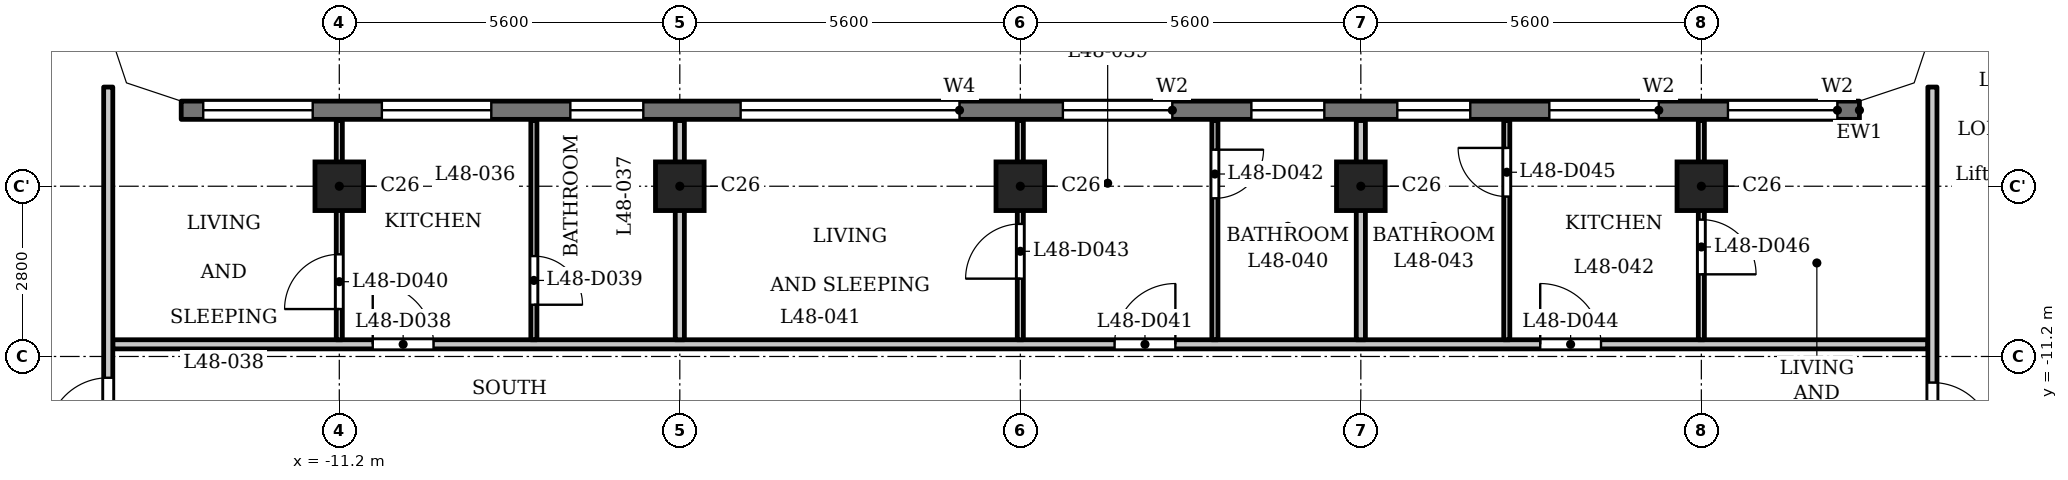
"""IFC4 building model, lengths in metres.
Left out: names, types, materials, properties, quantities, classifications, styles, units other than length and angle.
Written with IfcOpenShell. Run it as: python <this file> out.ifc"""

import sys

from ifc_helpers import new_model, si_unit, direction, frame, frame_2d, origin, origin_2d, place, context, subcontext, project, spatial, polyline, rectangle, outline, extrude, element, fill, save


model = new_model("IFC4")
c1 = context("Model", 3, precision=1e-05, world=origin(), true_north=direction((0.0, 1.0)))
c2 = subcontext(c1, "Body", "Model", "MODEL_VIEW")
j1 = project(units=[si_unit("LENGTHUNIT", "METRE"), si_unit("PLANEANGLEUNIT", "RADIAN")], contexts=[c1])
p1 = place(None, origin())
s1 = spatial("IfcSite", under=j1, at=p1, CompositionType="ELEMENT")
p2 = place(p1, origin())
s2 = spatial("IfcBuilding", under=s1, at=p2, CompositionType="ELEMENT")
p3 = place(p2, frame((0.0, 0.0, 188.9)))
s3 = spatial("IfcBuildingStorey", under=s2, at=p3, CompositionType="ELEMENT", Elevation=188.9)
for number, where, z_axis, x_axis in (
    (1, (-11.2, -8.4, 0.0), (0.0, 0.0, 1.0), (1.0, 0.0, 0.0)),
    (2, (-5.6, -8.4, 0.0), (0.0, 0.0, 1.0), (1.0, 0.0, 0.0)),
    (3, (0.0, -8.4, 0.0), (0.0, 0.0, 1.0), (1.0, 0.0, 0.0)),
    (4, (5.6, -8.4, 0.0), (0.0, 0.0, 1.0), (1.0, 0.0, 0.0)),
    (5, (11.2, -8.4, 0.0), (0.0, 0.0, 1.0), (1.0, 0.0, 0.0)),
):
    element("IfcColumn", number, at=place(p3, frame(where, z_axis=z_axis, x_axis=x_axis)), inside=s3, PredefinedType="COLUMN", context=c2, shape_type="SweptSolid", body=[
        extrude(rectangle(XDim=0.8, YDim=0.8, at=origin_2d()), origin(), (0.0, 0.0, 1.0), 3.5),
    ])
p4 = place(p3, frame((13.8, -7.15, 0.0), z_axis=(0.0, 0.0, 1.0), x_axis=(-1.0, 0.0, 0.0)))
e6 = element("IfcWall", 6, at=p4, inside=s3, PredefinedType="SOLIDWALL", context=c2, shape_type="SweptSolid", body=[
    extrude(rectangle(XDim=27.6, YDim=0.3, at=frame_2d((13.8, 0.0))), origin(), (0.0, 0.0, 1.0), 3.2),
])
p5 = place(p4, frame((0.363, 0.0, 0.9)))
e7 = element("IfcOpeningElement", 7, at=p5, cuts=e6, PredefinedType="OPENING", context=c2, shape_type="SweptSolid", body=[
    extrude(rectangle(XDim=1.8, YDim=1.25, at=frame_2d((0.9, 0.625))), frame((0.0, 0.16, 0.0), z_axis=(0.0, -1.0, 0.0), x_axis=(1.0, 0.0, 0.0)), (0.0, 0.0, 1.0), 0.32),
])
p6 = place(p4, frame((3.3, 0.0, 0.9)))
e8 = element("IfcOpeningElement", 8, at=p6, cuts=e6, PredefinedType="OPENING", context=c2, shape_type="SweptSolid", body=[
    extrude(rectangle(XDim=1.8, YDim=1.25, at=frame_2d((0.9, 0.625))), frame((0.0, 0.16, 0.0), z_axis=(0.0, -1.0, 0.0), x_axis=(1.0, 0.0, 0.0)), (0.0, 0.0, 1.0), 0.32),
])
p7 = place(p4, frame((6.4, 0.0, 0.6)))
e9 = element("IfcOpeningElement", 9, at=p7, cuts=e6, PredefinedType="OPENING", context=c2, shape_type="SweptSolid", body=[
    extrude(rectangle(XDim=1.2, YDim=1.55, at=frame_2d((0.6, 0.775))), frame((0.0, 0.16, 0.0), z_axis=(0.0, -1.0, 0.0), x_axis=(1.0, 0.0, 0.0)), (0.0, 0.0, 1.0), 0.32),
])
p8 = place(p4, frame((8.8, 0.0, 0.6)))
e10 = element("IfcOpeningElement", 10, at=p8, cuts=e6, PredefinedType="OPENING", context=c2, shape_type="SweptSolid", body=[
    extrude(rectangle(XDim=1.2, YDim=1.55, at=frame_2d((0.6, 0.775))), frame((0.0, 0.16, 0.0), z_axis=(0.0, -1.0, 0.0), x_axis=(1.0, 0.0, 0.0)), (0.0, 0.0, 1.0), 0.32),
])
p9 = place(p4, frame((11.3, 0.0, 0.9)))
e11 = element("IfcOpeningElement", 11, at=p9, cuts=e6, PredefinedType="OPENING", context=c2, shape_type="SweptSolid", body=[
    extrude(rectangle(XDim=1.8, YDim=1.25, at=frame_2d((0.9, 0.625))), frame((0.0, 0.16, 0.0), z_axis=(0.0, -1.0, 0.0), x_axis=(1.0, 0.0, 0.0)), (0.0, 0.0, 1.0), 0.32),
])
p10 = place(p4, frame((14.8, 0.0, 1.2)))
e12 = element("IfcOpeningElement", 12, at=p10, cuts=e6, PredefinedType="OPENING", context=c2, shape_type="SweptSolid", body=[
    extrude(rectangle(XDim=3.6, YDim=0.95, at=frame_2d((1.8, 0.475))), frame((0.0, 0.16, 0.0), z_axis=(0.0, -1.0, 0.0), x_axis=(1.0, 0.0, 0.0)), (0.0, 0.0, 1.0), 0.32),
])
p11 = place(p4, frame((20.0, 0.0, 0.6)))
e13 = element("IfcOpeningElement", 13, at=p11, cuts=e6, PredefinedType="OPENING", context=c2, shape_type="SweptSolid", body=[
    extrude(rectangle(XDim=1.2, YDim=1.55, at=frame_2d((0.6, 0.775))), frame((0.0, 0.16, 0.0), z_axis=(0.0, -1.0, 0.0), x_axis=(1.0, 0.0, 0.0)), (0.0, 0.0, 1.0), 0.32),
])
p12 = place(p4, frame((22.5, 0.0, 0.9)))
e14 = element("IfcOpeningElement", 14, at=p12, cuts=e6, PredefinedType="OPENING", context=c2, shape_type="SweptSolid", body=[
    extrude(rectangle(XDim=1.8, YDim=1.25, at=frame_2d((0.9, 0.625))), frame((0.0, 0.16, 0.0), z_axis=(0.0, -1.0, 0.0), x_axis=(1.0, 0.0, 0.0)), (0.0, 0.0, 1.0), 0.32),
])
p13 = place(p4, frame((25.438, 0.0, 0.9)))
e15 = element("IfcOpeningElement", 15, at=p13, cuts=e6, PredefinedType="OPENING", context=c2, shape_type="SweptSolid", body=[
    extrude(rectangle(XDim=1.8, YDim=1.25, at=frame_2d((0.9, 0.625))), frame((0.0, 0.16, 0.0), z_axis=(0.0, -1.0, 0.0), x_axis=(1.0, 0.0, 0.0)), (0.0, 0.0, 1.0), 0.32),
])
p14 = place(p3, frame((-14.925, -11.0, 0.0), z_axis=(0.0, 0.0, 1.0), x_axis=(1.0, 0.0, 0.0)))
e16 = element("IfcWall", 16, at=p14, inside=s3, PredefinedType="PARTITIONING", context=c2, shape_type="SweptSolid", body=[
    extrude(rectangle(XDim=29.85, YDim=0.15, at=frame_2d((14.925, 0.0))), origin(), (0.0, 0.0, 1.0), 3.2),
])
p15 = place(p14, frame((4.275, 0.0, 0.0)))
e17 = element("IfcOpeningElement", 17, at=p15, cuts=e16, PredefinedType="OPENING", context=c2, shape_type="SweptSolid", body=[
    extrude(rectangle(XDim=1.0, YDim=2.1, at=frame_2d((0.5, 1.05))), frame((0.0, 0.085, 0.0), z_axis=(0.0, -1.0, 0.0), x_axis=(1.0, 0.0, 0.0)), (0.0, 0.0, 1.0), 0.17),
])
p16 = place(p14, frame((16.475, 0.0, 0.0)))
e18 = element("IfcOpeningElement", 18, at=p16, cuts=e16, PredefinedType="OPENING", context=c2, shape_type="SweptSolid", body=[
    extrude(rectangle(XDim=1.0, YDim=2.1, at=frame_2d((0.5, 1.05))), frame((0.0, 0.085, 0.0), z_axis=(0.0, -1.0, 0.0), x_axis=(1.0, 0.0, 0.0)), (0.0, 0.0, 1.0), 0.17),
])
p17 = place(p14, frame((23.475, 0.0, 0.0)))
e19 = element("IfcOpeningElement", 19, at=p17, cuts=e16, PredefinedType="OPENING", context=c2, shape_type="SweptSolid", body=[
    extrude(rectangle(XDim=1.0, YDim=2.1, at=frame_2d((0.5, 1.05))), frame((0.0, 0.085, 0.0), z_axis=(0.0, -1.0, 0.0), x_axis=(1.0, 0.0, 0.0)), (0.0, 0.0, 1.0), 0.17),
])
p18 = place(p3, frame((-15.0, -13.125, 0.0), z_axis=(0.0, 0.0, 1.0), x_axis=(0.0, 1.0, 0.0)))
e20 = element("IfcWall", 20, at=p18, inside=s3, PredefinedType="PARTITIONING", context=c2, shape_type="SweptSolid", body=[
    extrude(rectangle(XDim=6.356, YDim=0.15, at=frame_2d((3.178, 0.0))), origin(), (0.0, 0.0, 1.0), 3.2),
])
p19 = place(p18, frame((0.575, 0.0, 0.0)))
e21 = element("IfcOpeningElement", 21, at=p19, cuts=e20, PredefinedType="OPENING", context=c2, shape_type="SweptSolid", body=[
    extrude(rectangle(XDim=1.0, YDim=2.1, at=frame_2d((0.5, 1.05))), frame((0.0, 0.085, 0.0), z_axis=(0.0, -1.0, 0.0), x_axis=(1.0, 0.0, 0.0)), (0.0, 0.0, 1.0), 0.17),
])
p20 = place(p3, frame((-11.2, -10.925, 0.0), z_axis=(0.0, 0.0, 1.0), x_axis=(0.0, 1.0, 0.0)))
e22 = element("IfcWall", 22, at=p20, inside=s3, PredefinedType="PARTITIONING", context=c2, shape_type="SweptSolid", body=[
    extrude(rectangle(XDim=3.605, YDim=0.1, at=frame_2d((1.802, 0.0))), origin(), (0.0, 0.0, 1.0), 3.2),
])
p21 = place(p20, frame((0.505, 0.0, 0.0)))
e23 = element("IfcOpeningElement", 23, at=p21, cuts=e22, PredefinedType="OPENING", context=c2, shape_type="SweptSolid", body=[
    extrude(rectangle(XDim=0.9, YDim=2.1, at=frame_2d((0.45, 1.05))), frame((0.0, 0.06, 0.0), z_axis=(0.0, -1.0, 0.0), x_axis=(1.0, 0.0, 0.0)), (0.0, 0.0, 1.0), 0.12),
])
p22 = place(p3, frame((-8.0, -10.925, 0.0), z_axis=(0.0, 0.0, 1.0), x_axis=(0.0, 1.0, 0.0)))
e24 = element("IfcWall", 24, at=p22, inside=s3, PredefinedType="PARTITIONING", context=c2, shape_type="SweptSolid", body=[
    extrude(rectangle(XDim=3.605, YDim=0.1, at=frame_2d((1.802, 0.0))), origin(), (0.0, 0.0, 1.0), 3.2),
])
p23 = place(p22, frame((0.576, 0.0, 0.0)))
e25 = element("IfcOpeningElement", 25, at=p23, cuts=e24, PredefinedType="OPENING", context=c2, shape_type="SweptSolid", body=[
    extrude(rectangle(XDim=0.8, YDim=2.1, at=frame_2d((0.4, 1.05))), frame((0.0, 0.06, 0.0), z_axis=(0.0, -1.0, 0.0), x_axis=(1.0, 0.0, 0.0)), (0.0, 0.0, 1.0), 0.12),
])
p24 = place(p3, frame((-5.6, -10.925, 0.0), z_axis=(0.0, 0.0, 1.0), x_axis=(0.0, 1.0, 0.0)))
e26 = element("IfcWall", 26, at=p24, inside=s3, PredefinedType="PARTITIONING", context=c2, shape_type="SweptSolid", body=[
    extrude(rectangle(XDim=3.605, YDim=0.15, at=frame_2d((1.802, 0.0))), origin(), (0.0, 0.0, 1.0), 3.2),
])
p25 = place(p3, frame((0.0, -10.925, 0.0), z_axis=(0.0, 0.0, 1.0), x_axis=(0.0, 1.0, 0.0)))
e27 = element("IfcWall", 27, at=p25, inside=s3, PredefinedType="PARTITIONING", context=c2, shape_type="SweptSolid", body=[
    extrude(rectangle(XDim=3.605, YDim=0.1, at=frame_2d((1.802, 0.0))), origin(), (0.0, 0.0, 1.0), 3.2),
])
p26 = place(p25, frame((1.005, 0.0, 0.0)))
e28 = element("IfcOpeningElement", 28, at=p26, cuts=e27, PredefinedType="OPENING", context=c2, shape_type="SweptSolid", body=[
    extrude(rectangle(XDim=0.9, YDim=2.1, at=frame_2d((0.45, 1.05))), frame((0.0, 0.06, 0.0), z_axis=(0.0, -1.0, 0.0), x_axis=(1.0, 0.0, 0.0)), (0.0, 0.0, 1.0), 0.12),
])
p27 = place(p3, frame((3.2, -10.925, 0.0), z_axis=(0.0, 0.0, 1.0), x_axis=(0.0, 1.0, 0.0)))
e29 = element("IfcWall", 29, at=p27, inside=s3, PredefinedType="PARTITIONING", context=c2, shape_type="SweptSolid", body=[
    extrude(rectangle(XDim=3.605, YDim=0.1, at=frame_2d((1.802, 0.0))), origin(), (0.0, 0.0, 1.0), 3.2),
])
p28 = place(p27, frame((2.326, 0.0, 0.0)))
e30 = element("IfcOpeningElement", 30, at=p28, cuts=e29, PredefinedType="OPENING", context=c2, shape_type="SweptSolid", body=[
    extrude(rectangle(XDim=0.8, YDim=2.1, at=frame_2d((0.4, 1.05))), frame((0.0, 0.06, 0.0), z_axis=(0.0, -1.0, 0.0), x_axis=(1.0, 0.0, 0.0)), (0.0, 0.0, 1.0), 0.12),
])
p29 = place(p3, frame((5.6, -10.925, 0.0), z_axis=(0.0, 0.0, 1.0), x_axis=(0.0, 1.0, 0.0)))
e31 = element("IfcWall", 31, at=p29, inside=s3, PredefinedType="PARTITIONING", context=c2, shape_type="SweptSolid", body=[
    extrude(rectangle(XDim=3.605, YDim=0.15, at=frame_2d((1.802, 0.0))), origin(), (0.0, 0.0, 1.0), 3.2),
])
p30 = place(p3, frame((8.0, -10.925, 0.0), z_axis=(0.0, 0.0, 1.0), x_axis=(0.0, 1.0, 0.0)))
e32 = element("IfcWall", 32, at=p30, inside=s3, PredefinedType="PARTITIONING", context=c2, shape_type="SweptSolid", body=[
    extrude(rectangle(XDim=3.605, YDim=0.1, at=frame_2d((1.802, 0.0))), origin(), (0.0, 0.0, 1.0), 3.2),
])
p31 = place(p30, frame((2.355, 0.0, 0.0)))
e33 = element("IfcOpeningElement", 33, at=p31, cuts=e32, PredefinedType="OPENING", context=c2, shape_type="SweptSolid", body=[
    extrude(rectangle(XDim=0.8, YDim=2.1, at=frame_2d((0.4, 1.05))), frame((0.0, 0.06, 0.0), z_axis=(0.0, -1.0, 0.0), x_axis=(1.0, 0.0, 0.0)), (0.0, 0.0, 1.0), 0.12),
])
p32 = place(p3, frame((11.2, -10.925, 0.0), z_axis=(0.0, 0.0, 1.0), x_axis=(0.0, 1.0, 0.0)))
e34 = element("IfcWall", 34, at=p32, inside=s3, PredefinedType="PARTITIONING", context=c2, shape_type="SweptSolid", body=[
    extrude(rectangle(XDim=3.605, YDim=0.1, at=frame_2d((1.802, 0.0))), origin(), (0.0, 0.0, 1.0), 3.2),
])
p33 = place(p32, frame((1.076, 0.0, 0.0)))
e35 = element("IfcOpeningElement", 35, at=p33, cuts=e34, PredefinedType="OPENING", context=c2, shape_type="SweptSolid", body=[
    extrude(rectangle(XDim=0.9, YDim=2.1, at=frame_2d((0.45, 1.05))), frame((0.0, 0.06, 0.0), z_axis=(0.0, -1.0, 0.0), x_axis=(1.0, 0.0, 0.0)), (0.0, 0.0, 1.0), 0.12),
])
p34 = place(p3, frame((15.0, -13.125, 0.0), z_axis=(0.0, 0.0, 1.0), x_axis=(0.0, 1.0, 0.0)))
e36 = element("IfcWall", 36, at=p34, inside=s3, PredefinedType="PARTITIONING", context=c2, shape_type="SweptSolid", body=[
    extrude(rectangle(XDim=6.356, YDim=0.15, at=frame_2d((3.178, 0.0))), origin(), (0.0, 0.0, 1.0), 3.2),
])
p35 = place(p34, frame((0.496, 0.0, 0.0)))
e37 = element("IfcOpeningElement", 37, at=p35, cuts=e36, PredefinedType="OPENING", context=c2, shape_type="SweptSolid", body=[
    extrude(rectangle(XDim=1.0, YDim=2.1, at=frame_2d((0.5, 1.05))), frame((0.0, 0.085, 0.0), z_axis=(0.0, -1.0, 0.0), x_axis=(1.0, 0.0, 0.0)), (0.0, 0.0, 1.0), 0.17),
])
p36 = place(p3, origin())
e38 = element("IfcWall", 38, at=p36, inside=s3, PredefinedType="SOLIDWALL", context=c2, shape_type="SweptSolid", body=[
    extrude(outline(polyline([(14.937, -6.937), (15.3, -5.849), (15.3, -5.8), (15.0, -5.8), (14.7, -6.7), (13.8, -7.0), (13.8, -7.3), (13.849, -7.3), (14.937, -6.937)])), origin(), (0.0, 0.0, 1.0), 3.2),
])
e39 = element("IfcWall", 39, at=p36, inside=s3, PredefinedType="SOLIDWALL", context=c2, shape_type="SweptSolid", body=[
    extrude(outline(polyline([(-14.937, -6.937), (-13.849, -7.3), (-13.8, -7.3), (-13.8, -7.0), (-14.7, -6.7), (-15.0, -5.8), (-15.3, -5.8), (-15.3, -5.849), (-14.937, -6.937)])), origin(), (0.0, 0.0, 1.0), 3.2),
])
p37 = place(p19, origin())
e40 = element("IfcDoor", 40, at=p37, inside=s3, OperationType="SINGLE_SWING_RIGHT", PredefinedType="DOOR", context=c2, shape_type="SweptSolid", body=[
    extrude(rectangle(XDim=1.0, YDim=2.1, at=frame_2d((0.5, 1.05))), frame((0.0, 0.025, 0.0), z_axis=(0.0, -1.0, 0.0), x_axis=(1.0, 0.0, 0.0)), (0.0, 0.0, 1.0), 0.05),
])
fill(e21, e40)
p38 = place(p35, origin())
e41 = element("IfcDoor", 41, at=p38, inside=s3, OperationType="SINGLE_SWING_LEFT", PredefinedType="DOOR", context=c2, shape_type="SweptSolid", body=[
    extrude(rectangle(XDim=1.0, YDim=2.1, at=frame_2d((0.5, 1.05))), frame((0.0, 0.025, 0.0), z_axis=(0.0, -1.0, 0.0), x_axis=(1.0, 0.0, 0.0)), (0.0, 0.0, 1.0), 0.05),
])
fill(e37, e41)
p39 = place(p15, origin())
e42 = element("IfcDoor", 42, at=p39, inside=s3, OperationType="SINGLE_SWING_RIGHT", PredefinedType="DOOR", context=c2, shape_type="SweptSolid", body=[
    extrude(rectangle(XDim=1.0, YDim=2.1, at=frame_2d((0.5, 1.05))), frame((0.0, 0.025, 0.0), z_axis=(0.0, -1.0, 0.0), x_axis=(1.0, 0.0, 0.0)), (0.0, 0.0, 1.0), 0.05),
])
fill(e17, e42)
p40 = place(p23, origin())
e43 = element("IfcDoor", 43, at=p40, inside=s3, OperationType="SINGLE_SWING_LEFT", PredefinedType="DOOR", context=c2, shape_type="SweptSolid", body=[
    extrude(rectangle(XDim=0.8, YDim=2.1, at=frame_2d((0.4, 1.05))), frame((0.0, 0.025, 0.0), z_axis=(0.0, -1.0, 0.0), x_axis=(1.0, 0.0, 0.0)), (0.0, 0.0, 1.0), 0.05),
])
fill(e25, e43)
p41 = place(p21, origin())
e44 = element("IfcDoor", 44, at=p41, inside=s3, OperationType="SINGLE_SWING_RIGHT", PredefinedType="DOOR", context=c2, shape_type="SweptSolid", body=[
    extrude(rectangle(XDim=0.9, YDim=2.1, at=frame_2d((0.45, 1.05))), frame((0.0, 0.025, 0.0), z_axis=(0.0, -1.0, 0.0), x_axis=(1.0, 0.0, 0.0)), (0.0, 0.0, 1.0), 0.05),
])
fill(e23, e44)
p42 = place(p16, origin())
e45 = element("IfcDoor", 45, at=p42, inside=s3, OperationType="SINGLE_SWING_LEFT", PredefinedType="DOOR", context=c2, shape_type="SweptSolid", body=[
    extrude(rectangle(XDim=1.0, YDim=2.1, at=frame_2d((0.5, 1.05))), frame((0.0, 0.025, 0.0), z_axis=(0.0, -1.0, 0.0), x_axis=(1.0, 0.0, 0.0)), (0.0, 0.0, 1.0), 0.05),
])
fill(e18, e45)
p43 = place(p28, origin())
e46 = element("IfcDoor", 46, at=p43, inside=s3, OperationType="SINGLE_SWING_RIGHT", PredefinedType="DOOR", context=c2, shape_type="SweptSolid", body=[
    extrude(rectangle(XDim=0.8, YDim=2.1, at=frame_2d((0.4, 1.05))), frame((0.0, 0.025, 0.0), z_axis=(0.0, -1.0, 0.0), x_axis=(1.0, 0.0, 0.0)), (0.0, 0.0, 1.0), 0.05),
])
fill(e30, e46)
p44 = place(p26, origin())
e47 = element("IfcDoor", 47, at=p44, inside=s3, OperationType="SINGLE_SWING_RIGHT", PredefinedType="DOOR", context=c2, shape_type="SweptSolid", body=[
    extrude(rectangle(XDim=0.9, YDim=2.1, at=frame_2d((0.45, 1.05))), frame((0.0, 0.025, 0.0), z_axis=(0.0, -1.0, 0.0), x_axis=(1.0, 0.0, 0.0)), (0.0, 0.0, 1.0), 0.05),
])
fill(e28, e47)
p45 = place(p17, origin())
e48 = element("IfcDoor", 48, at=p45, inside=s3, OperationType="SINGLE_SWING_RIGHT", PredefinedType="DOOR", context=c2, shape_type="SweptSolid", body=[
    extrude(rectangle(XDim=1.0, YDim=2.1, at=frame_2d((0.5, 1.05))), frame((0.0, 0.025, 0.0), z_axis=(0.0, -1.0, 0.0), x_axis=(1.0, 0.0, 0.0)), (0.0, 0.0, 1.0), 0.05),
])
fill(e19, e48)
p46 = place(p31, origin())
e49 = element("IfcDoor", 49, at=p46, inside=s3, OperationType="SINGLE_SWING_LEFT", PredefinedType="DOOR", context=c2, shape_type="SweptSolid", body=[
    extrude(rectangle(XDim=0.8, YDim=2.1, at=frame_2d((0.4, 1.05))), frame((0.0, 0.025, 0.0), z_axis=(0.0, -1.0, 0.0), x_axis=(1.0, 0.0, 0.0)), (0.0, 0.0, 1.0), 0.05),
])
fill(e33, e49)
p47 = place(p33, origin())
e50 = element("IfcDoor", 50, at=p47, inside=s3, OperationType="SINGLE_SWING_LEFT", PredefinedType="DOOR", context=c2, shape_type="SweptSolid", body=[
    extrude(rectangle(XDim=0.9, YDim=2.1, at=frame_2d((0.45, 1.05))), frame((0.0, 0.025, 0.0), z_axis=(0.0, -1.0, 0.0), x_axis=(1.0, 0.0, 0.0)), (0.0, 0.0, 1.0), 0.05),
])
fill(e35, e50)
p48 = place(p5, origin())
e51 = element("IfcWindow", 51, at=p48, inside=s3, PartitioningType="SINGLE_PANEL", PredefinedType="WINDOW", context=c2, shape_type="SweptSolid", body=[
    extrude(rectangle(XDim=1.8, YDim=1.25, at=frame_2d((0.9, 0.625))), frame((0.0, 0.03, 0.0), z_axis=(0.0, -1.0, 0.0), x_axis=(1.0, 0.0, 0.0)), (0.0, 0.0, 1.0), 0.06),
])
fill(e7, e51)
p49 = place(p6, origin())
e52 = element("IfcWindow", 52, at=p49, inside=s3, PartitioningType="SINGLE_PANEL", PredefinedType="WINDOW", context=c2, shape_type="SweptSolid", body=[
    extrude(rectangle(XDim=1.8, YDim=1.25, at=frame_2d((0.9, 0.625))), frame((0.0, 0.03, 0.0), z_axis=(0.0, -1.0, 0.0), x_axis=(1.0, 0.0, 0.0)), (0.0, 0.0, 1.0), 0.06),
])
fill(e8, e52)
p50 = place(p7, origin())
e53 = element("IfcWindow", 53, at=p50, inside=s3, PartitioningType="SINGLE_PANEL", PredefinedType="WINDOW", context=c2, shape_type="SweptSolid", body=[
    extrude(rectangle(XDim=1.2, YDim=1.55, at=frame_2d((0.6, 0.775))), frame((0.0, 0.03, 0.0), z_axis=(0.0, -1.0, 0.0), x_axis=(1.0, 0.0, 0.0)), (0.0, 0.0, 1.0), 0.06),
])
fill(e9, e53)
p51 = place(p8, origin())
e54 = element("IfcWindow", 54, at=p51, inside=s3, PartitioningType="SINGLE_PANEL", PredefinedType="WINDOW", context=c2, shape_type="SweptSolid", body=[
    extrude(rectangle(XDim=1.2, YDim=1.55, at=frame_2d((0.6, 0.775))), frame((0.0, 0.03, 0.0), z_axis=(0.0, -1.0, 0.0), x_axis=(1.0, 0.0, 0.0)), (0.0, 0.0, 1.0), 0.06),
])
fill(e10, e54)
p52 = place(p9, origin())
e55 = element("IfcWindow", 55, at=p52, inside=s3, PartitioningType="SINGLE_PANEL", PredefinedType="WINDOW", context=c2, shape_type="SweptSolid", body=[
    extrude(rectangle(XDim=1.8, YDim=1.25, at=frame_2d((0.9, 0.625))), frame((0.0, 0.03, 0.0), z_axis=(0.0, -1.0, 0.0), x_axis=(1.0, 0.0, 0.0)), (0.0, 0.0, 1.0), 0.06),
])
fill(e11, e55)
p53 = place(p10, origin())
e56 = element("IfcWindow", 56, at=p53, inside=s3, PartitioningType="SINGLE_PANEL", PredefinedType="WINDOW", context=c2, shape_type="SweptSolid", body=[
    extrude(rectangle(XDim=3.6, YDim=0.95, at=frame_2d((1.8, 0.475))), frame((0.0, 0.03, 0.0), z_axis=(0.0, -1.0, 0.0), x_axis=(1.0, 0.0, 0.0)), (0.0, 0.0, 1.0), 0.06),
])
fill(e12, e56)
p54 = place(p11, origin())
e57 = element("IfcWindow", 57, at=p54, inside=s3, PartitioningType="SINGLE_PANEL", PredefinedType="WINDOW", context=c2, shape_type="SweptSolid", body=[
    extrude(rectangle(XDim=1.2, YDim=1.55, at=frame_2d((0.6, 0.775))), frame((0.0, 0.03, 0.0), z_axis=(0.0, -1.0, 0.0), x_axis=(1.0, 0.0, 0.0)), (0.0, 0.0, 1.0), 0.06),
])
fill(e13, e57)
p55 = place(p12, origin())
e58 = element("IfcWindow", 58, at=p55, inside=s3, PartitioningType="SINGLE_PANEL", PredefinedType="WINDOW", context=c2, shape_type="SweptSolid", body=[
    extrude(rectangle(XDim=1.8, YDim=1.25, at=frame_2d((0.9, 0.625))), frame((0.0, 0.03, 0.0), z_axis=(0.0, -1.0, 0.0), x_axis=(1.0, 0.0, 0.0)), (0.0, 0.0, 1.0), 0.06),
])
fill(e14, e58)
p56 = place(p13, origin())
e59 = element("IfcWindow", 59, at=p56, inside=s3, PartitioningType="SINGLE_PANEL", PredefinedType="WINDOW", context=c2, shape_type="SweptSolid", body=[
    extrude(rectangle(XDim=1.8, YDim=1.25, at=frame_2d((0.9, 0.625))), frame((0.0, 0.03, 0.0), z_axis=(0.0, -1.0, 0.0), x_axis=(1.0, 0.0, 0.0)), (0.0, 0.0, 1.0), 0.06),
])
fill(e15, e59)
save(model, sys.argv[1])
